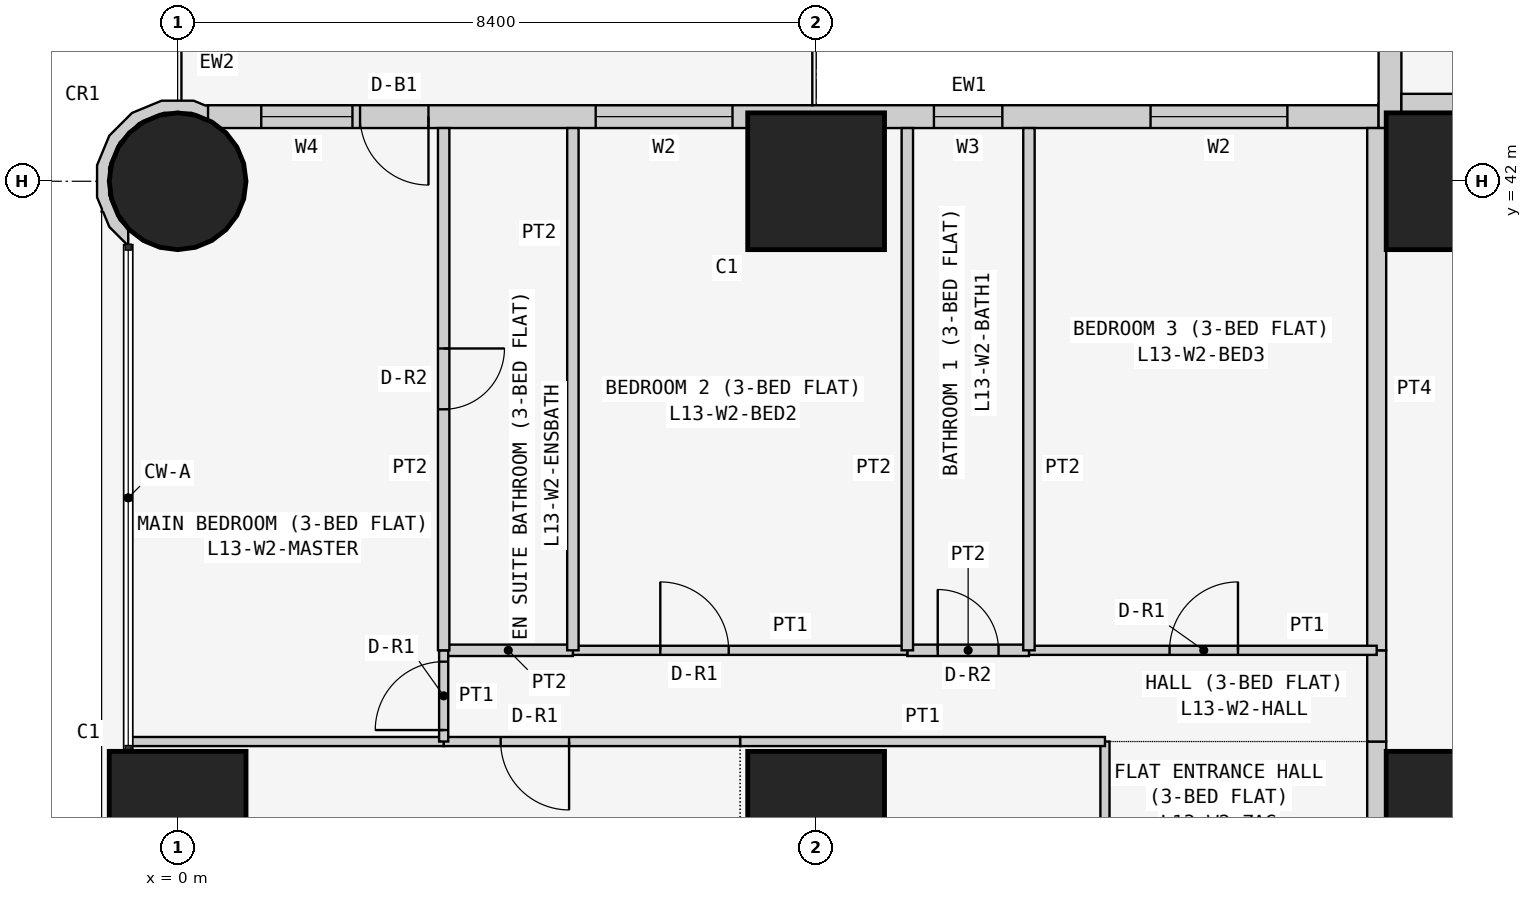
"""IFC4 building model, lengths in metres.
Left out: names, types, materials, properties, quantities, classifications, styles, units other than length and angle.
Written with IfcOpenShell. Run it as: python <this file> out.ifc"""

import sys

from ifc_helpers import new_model, si_unit, direction, frame, frame_2d, origin, origin_2d, place, context, subcontext, project, spatial, polyline, rectangle, circle, outline, extrude, element, fill, save


model = new_model("IFC4")
c1 = context("Model", 3, precision=1e-05, world=origin(), true_north=direction((0.0, 1.0)))
c2 = subcontext(c1, "Body", "Model", "MODEL_VIEW")
j1 = project(units=[si_unit("LENGTHUNIT", "METRE"), si_unit("PLANEANGLEUNIT", "RADIAN")], contexts=[c1])
p1 = place(None, origin())
s1 = spatial("IfcSite", under=j1, at=p1, CompositionType="ELEMENT")
p2 = place(p1, origin())
s2 = spatial("IfcBuilding", under=s1, at=p2, CompositionType="ELEMENT")
p3 = place(p2, frame((0.0, 0.0, 56.1)))
s3 = spatial("IfcBuildingStorey", under=s2, at=p3, CompositionType="ELEMENT", Elevation=56.1)
p4 = place(p3, frame((0.0, 33.6, 0.0), z_axis=(0.0, 0.0, 1.0), x_axis=(1.0, 0.0, 0.0)))
e1 = element("IfcColumn", 1, at=p4, inside=s3, PredefinedType="COLUMN", context=c2, shape_type="SweptSolid", body=[
    extrude(rectangle(XDim=1.8, YDim=1.8, at=origin_2d()), origin(), (0.0, 0.0, 1.0), 3.6),
])
p5 = place(p3, frame((0.0, 42.0, 0.0), z_axis=(0.0, 0.0, 1.0), x_axis=(1.0, 0.0, 0.0)))
e2 = element("IfcColumn", 2, at=p5, inside=s3, PredefinedType="COLUMN", context=c2, shape_type="SweptSolid", body=[
    extrude(circle(Radius=0.9, at=origin_2d()), origin(), (0.0, 0.0, 1.0), 3.6),
])
for number, where, z_axis, x_axis in (
    (3, (8.4, 33.6, 0.0), (0.0, 0.0, 1.0), (1.0, 0.0, 0.0)),
    (4, (8.4, 42.0, 0.0), (0.0, 0.0, 1.0), (1.0, 0.0, 0.0)),
    (5, (16.8, 33.6, 0.0), (0.0, 0.0, 1.0), (1.0, 0.0, 0.0)),
    (6, (16.8, 42.0, 0.0), (0.0, 0.0, 1.0), (1.0, 0.0, 0.0)),
):
    element("IfcColumn", number, at=place(p3, frame(where, z_axis=z_axis, x_axis=x_axis)), inside=s3, PredefinedType="COLUMN", context=c2, shape_type="SweptSolid", body=[
        extrude(rectangle(XDim=1.8, YDim=1.8, at=origin_2d()), origin(), (0.0, 0.0, 1.0), 3.6),
    ])
p6 = place(p3, frame((15.8, 42.85, 0.0), z_axis=(0.0, 0.0, 1.0), x_axis=(-1.0, 0.0, 0.0)))
e7 = element("IfcWall", 7, at=p6, inside=s3, PredefinedType="SOLIDWALL", context=c2, shape_type="SweptSolid", body=[
    extrude(rectangle(XDim=15.4, YDim=0.3, at=frame_2d((7.7, 0.0))), origin(), (0.0, 0.0, 1.0), 3.45),
])
p7 = place(p6, frame((1.2, 0.0, 0.9)))
e8 = element("IfcOpeningElement", 8, at=p7, cuts=e7, PredefinedType="OPENING", context=c2, shape_type="SweptSolid", body=[
    extrude(rectangle(XDim=1.8, YDim=1.5, at=frame_2d((0.9, 0.75))), frame((0.0, 0.16, 0.0), z_axis=(0.0, -1.0, 0.0), x_axis=(1.0, 0.0, 0.0)), (0.0, 0.0, 1.0), 0.32),
])
p8 = place(p6, frame((4.95, 0.0, 1.5)))
e9 = element("IfcOpeningElement", 9, at=p8, cuts=e7, PredefinedType="OPENING", context=c2, shape_type="SweptSolid", body=[
    extrude(rectangle(XDim=0.9, YDim=0.7, at=frame_2d((0.45, 0.35))), frame((0.0, 0.16, 0.0), z_axis=(0.0, -1.0, 0.0), x_axis=(1.0, 0.0, 0.0)), (0.0, 0.0, 1.0), 0.32),
])
p9 = place(p6, frame((8.5, 0.0, 0.9)))
e10 = element("IfcOpeningElement", 10, at=p9, cuts=e7, PredefinedType="OPENING", context=c2, shape_type="SweptSolid", body=[
    extrude(rectangle(XDim=1.8, YDim=1.5, at=frame_2d((0.9, 0.75))), frame((0.0, 0.16, 0.0), z_axis=(0.0, -1.0, 0.0), x_axis=(1.0, 0.0, 0.0)), (0.0, 0.0, 1.0), 0.32),
])
p10 = place(p6, frame((12.5, 0.0, 0.0)))
e11 = element("IfcOpeningElement", 11, at=p10, cuts=e7, PredefinedType="OPENING", context=c2, shape_type="SweptSolid", body=[
    extrude(rectangle(XDim=0.9, YDim=2.4, at=frame_2d((0.45, 1.2))), frame((0.0, 0.16, 0.0), z_axis=(0.0, -1.0, 0.0), x_axis=(1.0, 0.0, 0.0)), (0.0, 0.0, 1.0), 0.32),
])
p11 = place(p6, frame((13.5, 0.0, 0.9)))
e12 = element("IfcOpeningElement", 12, at=p11, cuts=e7, PredefinedType="OPENING", context=c2, shape_type="SweptSolid", body=[
    extrude(rectangle(XDim=1.2, YDim=1.5, at=frame_2d((0.6, 0.75))), frame((0.0, 0.16, 0.0), z_axis=(0.0, -1.0, 0.0), x_axis=(1.0, 0.0, 0.0)), (0.0, 0.0, 1.0), 0.32),
])
p12 = place(p3, frame((15.95, 58.4, 0.0), z_axis=(0.0, 0.0, 1.0), x_axis=(0.0, -1.0, 0.0)))
e13 = element("IfcWall", 13, at=p12, inside=s3, PredefinedType="SOLIDWALL", context=c2, shape_type="SweptSolid", body=[
    extrude(rectangle(XDim=15.7, YDim=0.3, at=frame_2d((7.85, 0.0))), origin(), (0.0, 0.0, 1.0), 3.45),
])
p13 = place(p12, frame((12.4, 0.0, 0.9)))
e14 = element("IfcOpeningElement", 14, at=p13, cuts=e13, PredefinedType="OPENING", context=c2, shape_type="SweptSolid", body=[
    extrude(rectangle(XDim=1.8, YDim=1.5, at=frame_2d((0.9, 0.75))), frame((0.0, 0.16, 0.0), z_axis=(0.0, -1.0, 0.0), x_axis=(1.0, 0.0, 0.0)), (0.0, 0.0, 1.0), 0.32),
])
p14 = place(p12, frame((9.55, 0.0, 1.5)))
e15 = element("IfcOpeningElement", 15, at=p14, cuts=e13, PredefinedType="OPENING", context=c2, shape_type="SweptSolid", body=[
    extrude(rectangle(XDim=0.9, YDim=0.7, at=frame_2d((0.45, 0.35))), frame((0.0, 0.16, 0.0), z_axis=(0.0, -1.0, 0.0), x_axis=(1.0, 0.0, 0.0)), (0.0, 0.0, 1.0), 0.32),
])
p15 = place(p12, frame((5.1, 0.0, 0.9)))
e16 = element("IfcOpeningElement", 16, at=p15, cuts=e13, PredefinedType="OPENING", context=c2, shape_type="SweptSolid", body=[
    extrude(rectangle(XDim=1.8, YDim=1.5, at=frame_2d((0.9, 0.75))), frame((0.0, 0.16, 0.0), z_axis=(0.0, -1.0, 0.0), x_axis=(1.0, 0.0, 0.0)), (0.0, 0.0, 1.0), 0.32),
])
p16 = place(p12, frame((2.0, 0.0, 0.0)))
e17 = element("IfcOpeningElement", 17, at=p16, cuts=e13, PredefinedType="OPENING", context=c2, shape_type="SweptSolid", body=[
    extrude(rectangle(XDim=0.9, YDim=2.4, at=frame_2d((0.45, 1.2))), frame((0.0, 0.16, 0.0), z_axis=(0.0, -1.0, 0.0), x_axis=(1.0, 0.0, 0.0)), (0.0, 0.0, 1.0), 0.32),
])
p17 = place(p12, frame((0.7, 0.0, 0.9)))
e18 = element("IfcOpeningElement", 18, at=p17, cuts=e13, PredefinedType="OPENING", context=c2, shape_type="SweptSolid", body=[
    extrude(rectangle(XDim=1.2, YDim=1.5, at=frame_2d((0.6, 0.75))), frame((0.0, 0.16, 0.0), z_axis=(0.0, -1.0, 0.0), x_axis=(1.0, 0.0, 0.0)), (0.0, 0.0, 1.0), 0.32),
])
p18 = place(p3, frame((0.364, 42.91, 0.0), z_axis=(0.0, 0.0, 1.0), x_axis=(-0.926129809145, 0.377204953059, 0.0)))
e19 = element("IfcWall", 19, at=p18, inside=s3, PredefinedType="SOLIDWALL", context=c2, shape_type="SweptSolid", body=[
    extrude(outline(polyline([(0.36, 1.803), (0.509, 1.741), (0.761, 1.486), (0.896, 1.154), (0.894, 0.795), (0.755, 0.465), (0.5, 0.213), (0.168, 0.078), (-0.1, 0.08), (0.001, -0.097), (0.03, -0.08), (0.199, -0.081), (0.589, 0.078), (0.889, 0.374), (1.053, 0.763), (1.055, 1.185), (0.896, 1.575), (0.778, 1.695), (0.769, 1.728), (0.75, 1.723), (0.6, 1.875), (0.295, 2.003), (0.281, 1.998), (0.36, 1.803)])), origin(), (0.0, 0.0, 1.0), 3.45),
])
p19 = place(p3, frame((16.1, 43.025, 0.0), z_axis=(0.0, 0.0, 1.0), x_axis=(1.0, 0.0, 0.0)))
e20 = element("IfcWall", 20, at=p19, inside=s3, PredefinedType="PARTITIONING", context=c2, shape_type="SweptSolid", body=[
    extrude(rectangle(XDim=6.871, YDim=0.25, at=frame_2d((3.436, 0.0))), origin(), (0.0, 0.0, 1.0), 3.45),
])
p20 = place(p3, frame((15.775, 29.4, 0.0), z_axis=(0.0, 0.0, 1.0), x_axis=(0.0, 1.0, 0.0)))
e21 = element("IfcWall", 21, at=p20, inside=s3, PredefinedType="PARTITIONING", context=c2, shape_type="SweptSolid", body=[
    extrude(rectangle(XDim=5.229, YDim=0.25, at=frame_2d((2.615, 0.0))), origin(), (0.0, 0.0, 1.0), 3.45),
])
p21 = place(p20, frame((2.1, 0.0, 0.0)))
e22 = element("IfcOpeningElement", 22, at=p21, cuts=e21, PredefinedType="OPENING", context=c2, shape_type="SweptSolid", body=[
    extrude(rectangle(XDim=1.0, YDim=2.1, at=frame_2d((0.5, 1.05))), frame((0.0, 0.135, 0.0), z_axis=(0.0, -1.0, 0.0), x_axis=(1.0, 0.0, 0.0)), (0.0, 0.0, 1.0), 0.27),
])
p22 = place(p3, frame((15.775, 34.629, 0.0), z_axis=(0.0, 0.0, 1.0), x_axis=(0.0, 1.0, 0.0)))
e23 = element("IfcWall", 23, at=p22, inside=s3, PredefinedType="PARTITIONING", context=c2, shape_type="SweptSolid", body=[
    extrude(rectangle(XDim=1.2, YDim=0.25, at=frame_2d((0.6, 0.0))), origin(), (0.0, 0.0, 1.0), 3.45),
])
p23 = place(p3, frame((15.775, 35.829, 0.0), z_axis=(0.0, 0.0, 1.0), x_axis=(0.0, 1.0, 0.0)))
e24 = element("IfcWall", 24, at=p23, inside=s3, PredefinedType="PARTITIONING", context=c2, shape_type="SweptSolid", body=[
    extrude(rectangle(XDim=6.871, YDim=0.25, at=frame_2d((3.436, 0.0))), origin(), (0.0, 0.0, 1.0), 3.45),
])
p24 = place(p3, frame((12.2, 29.4, 0.0), z_axis=(0.0, 0.0, 1.0), x_axis=(0.0, 1.0, 0.0)))
e25 = element("IfcWall", 25, at=p24, inside=s3, PredefinedType="PARTITIONING", context=c2, shape_type="SweptSolid", body=[
    extrude(rectangle(XDim=5.229, YDim=0.12, at=frame_2d((2.615, 0.0))), origin(), (0.0, 0.0, 1.0), 3.45),
])
p25 = place(p24, frame((1.05, 0.0, 0.0)))
e26 = element("IfcOpeningElement", 26, at=p25, cuts=e25, PredefinedType="OPENING", context=c2, shape_type="SweptSolid", body=[
    extrude(rectangle(XDim=0.9, YDim=2.1, at=frame_2d((0.45, 1.05))), frame((0.0, 0.07, 0.0), z_axis=(0.0, -1.0, 0.0), x_axis=(1.0, 0.0, 0.0)), (0.0, 0.0, 1.0), 0.14),
])
p26 = place(p3, frame((7.4, 34.629, 0.0), z_axis=(0.0, 0.0, 1.0), x_axis=(1.0, 0.0, 0.0)))
e27 = element("IfcWall", 27, at=p26, inside=s3, PredefinedType="PARTITIONING", context=c2, shape_type="SweptSolid", body=[
    extrude(rectangle(XDim=4.8, YDim=0.12, at=frame_2d((2.4, 0.0))), origin(), (0.0, 0.0, 1.0), 3.45),
])
p27 = place(p3, frame((3.5, 34.629, 0.0), z_axis=(0.0, 0.0, 1.0), x_axis=(1.0, 0.0, 0.0)))
e28 = element("IfcWall", 28, at=p27, inside=s3, PredefinedType="PARTITIONING", context=c2, shape_type="SweptSolid", body=[
    extrude(rectangle(XDim=3.9, YDim=0.12, at=frame_2d((1.95, 0.0))), origin(), (0.0, 0.0, 1.0), 3.45),
])
p28 = place(p27, frame((0.75, 0.0, 0.0)))
e29 = element("IfcOpeningElement", 29, at=p28, cuts=e28, PredefinedType="OPENING", context=c2, shape_type="SweptSolid", body=[
    extrude(rectangle(XDim=0.9, YDim=2.1, at=frame_2d((0.45, 1.05))), frame((0.0, 0.07, 0.0), z_axis=(0.0, -1.0, 0.0), x_axis=(1.0, 0.0, 0.0)), (0.0, 0.0, 1.0), 0.14),
])
p29 = place(p3, frame((-0.65, 34.629, 0.0), z_axis=(0.0, 0.0, 1.0), x_axis=(1.0, 0.0, 0.0)))
e30 = element("IfcWall", 30, at=p29, inside=s3, PredefinedType="PARTITIONING", context=c2, shape_type="SweptSolid", body=[
    extrude(rectangle(XDim=4.15, YDim=0.12, at=frame_2d((2.075, 0.0))), origin(), (0.0, 0.0, 1.0), 3.45),
])
p30 = place(p3, frame((11.2, 35.829, 0.0), z_axis=(0.0, 0.0, 1.0), x_axis=(1.0, 0.0, 0.0)))
e31 = element("IfcWall", 31, at=p30, inside=s3, PredefinedType="PARTITIONING", context=c2, shape_type="SweptSolid", body=[
    extrude(rectangle(XDim=4.575, YDim=0.12, at=frame_2d((2.288, 0.0))), origin(), (0.0, 0.0, 1.0), 3.45),
])
p31 = place(p30, frame((1.85, 0.0, 0.0)))
e32 = element("IfcOpeningElement", 32, at=p31, cuts=e31, PredefinedType="OPENING", context=c2, shape_type="SweptSolid", body=[
    extrude(rectangle(XDim=0.9, YDim=2.1, at=frame_2d((0.45, 1.05))), frame((0.0, 0.07, 0.0), z_axis=(0.0, -1.0, 0.0), x_axis=(1.0, 0.0, 0.0)), (0.0, 0.0, 1.0), 0.14),
])
p32 = place(p3, frame((9.6, 35.829, 0.0), z_axis=(0.0, 0.0, 1.0), x_axis=(1.0, 0.0, 0.0)))
e33 = element("IfcWall", 33, at=p32, inside=s3, PredefinedType="PARTITIONING", context=c2, shape_type="SweptSolid", body=[
    extrude(rectangle(XDim=1.6, YDim=0.15, at=frame_2d((0.8, 0.0))), origin(), (0.0, 0.0, 1.0), 3.45),
])
p33 = place(p32, frame((0.4, 0.0, 0.0)))
e34 = element("IfcOpeningElement", 34, at=p33, cuts=e33, PredefinedType="OPENING", context=c2, shape_type="SweptSolid", body=[
    extrude(rectangle(XDim=0.8, YDim=2.1, at=frame_2d((0.4, 1.05))), frame((0.0, 0.085, 0.0), z_axis=(0.0, -1.0, 0.0), x_axis=(1.0, 0.0, 0.0)), (0.0, 0.0, 1.0), 0.17),
])
p34 = place(p3, frame((5.2, 35.829, 0.0), z_axis=(0.0, 0.0, 1.0), x_axis=(1.0, 0.0, 0.0)))
e35 = element("IfcWall", 35, at=p34, inside=s3, PredefinedType="PARTITIONING", context=c2, shape_type="SweptSolid", body=[
    extrude(rectangle(XDim=4.4, YDim=0.12, at=frame_2d((2.2, 0.0))), origin(), (0.0, 0.0, 1.0), 3.45),
])
p35 = place(p34, frame((1.15, 0.0, 0.0)))
e36 = element("IfcOpeningElement", 36, at=p35, cuts=e35, PredefinedType="OPENING", context=c2, shape_type="SweptSolid", body=[
    extrude(rectangle(XDim=0.9, YDim=2.1, at=frame_2d((0.45, 1.05))), frame((0.0, 0.07, 0.0), z_axis=(0.0, -1.0, 0.0), x_axis=(1.0, 0.0, 0.0)), (0.0, 0.0, 1.0), 0.14),
])
p36 = place(p3, frame((3.5, 35.829, 0.0), z_axis=(0.0, 0.0, 1.0), x_axis=(1.0, 0.0, 0.0)))
e37 = element("IfcWall", 37, at=p36, inside=s3, PredefinedType="PARTITIONING", context=c2, shape_type="SweptSolid", body=[
    extrude(rectangle(XDim=1.7, YDim=0.15, at=frame_2d((0.85, 0.0))), origin(), (0.0, 0.0, 1.0), 3.45),
])
p37 = place(p3, frame((3.5, 34.629, 0.0), z_axis=(0.0, 0.0, 1.0), x_axis=(0.0, 1.0, 0.0)))
e38 = element("IfcWall", 38, at=p37, inside=s3, PredefinedType="PARTITIONING", context=c2, shape_type="SweptSolid", body=[
    extrude(rectangle(XDim=1.2, YDim=0.12, at=frame_2d((0.6, 0.0))), origin(), (0.0, 0.0, 1.0), 3.45),
])
p38 = place(p37, frame((0.151, 0.0, 0.0)))
e39 = element("IfcOpeningElement", 39, at=p38, cuts=e38, PredefinedType="OPENING", context=c2, shape_type="SweptSolid", body=[
    extrude(rectangle(XDim=0.9, YDim=2.1, at=frame_2d((0.45, 1.05))), frame((0.0, 0.07, 0.0), z_axis=(0.0, -1.0, 0.0), x_axis=(1.0, 0.0, 0.0)), (0.0, 0.0, 1.0), 0.14),
])
for number, where, z_axis, x_axis in (
    (40, (11.2, 35.829, 0.0), (0.0, 0.0, 1.0), (0.0, 1.0, 0.0)),
    (41, (9.6, 35.829, 0.0), (0.0, 0.0, 1.0), (0.0, 1.0, 0.0)),
    (42, (5.2, 35.829, 0.0), (0.0, 0.0, 1.0), (0.0, 1.0, 0.0)),
):
    element("IfcWall", number, at=place(p3, frame(where, z_axis=z_axis, x_axis=x_axis)), inside=s3, PredefinedType="PARTITIONING", context=c2, shape_type="SweptSolid", body=[
        extrude(rectangle(XDim=6.871, YDim=0.15, at=frame_2d((3.436, 0.0))), origin(), (0.0, 0.0, 1.0), 3.45),
    ])
p39 = place(p3, frame((3.5, 35.829, 0.0), z_axis=(0.0, 0.0, 1.0), x_axis=(0.0, 1.0, 0.0)))
e43 = element("IfcWall", 43, at=p39, inside=s3, PredefinedType="PARTITIONING", context=c2, shape_type="SweptSolid", body=[
    extrude(rectangle(XDim=6.871, YDim=0.15, at=frame_2d((3.436, 0.0))), origin(), (0.0, 0.0, 1.0), 3.45),
])
p40 = place(p39, frame((3.171, 0.0, 0.0)))
e44 = element("IfcOpeningElement", 44, at=p40, cuts=e43, PredefinedType="OPENING", context=c2, shape_type="SweptSolid", body=[
    extrude(rectangle(XDim=0.8, YDim=2.1, at=frame_2d((0.4, 1.05))), frame((0.0, 0.085, 0.0), z_axis=(0.0, -1.0, 0.0), x_axis=(1.0, 0.0, 0.0)), (0.0, 0.0, 1.0), 0.17),
])
p41 = place(p7, origin())
e45 = element("IfcWindow", 45, at=p41, inside=s3, PartitioningType="SINGLE_PANEL", PredefinedType="WINDOW", context=c2, shape_type="SweptSolid", body=[
    extrude(rectangle(XDim=1.8, YDim=1.5, at=frame_2d((0.9, 0.75))), frame((0.0, 0.03, 0.0), z_axis=(0.0, -1.0, 0.0), x_axis=(1.0, 0.0, 0.0)), (0.0, 0.0, 1.0), 0.06),
])
fill(e8, e45)
p42 = place(p8, origin())
e46 = element("IfcWindow", 46, at=p42, inside=s3, PartitioningType="SINGLE_PANEL", PredefinedType="WINDOW", context=c2, shape_type="SweptSolid", body=[
    extrude(rectangle(XDim=0.9, YDim=0.7, at=frame_2d((0.45, 0.35))), frame((0.0, 0.03, 0.0), z_axis=(0.0, -1.0, 0.0), x_axis=(1.0, 0.0, 0.0)), (0.0, 0.0, 1.0), 0.06),
])
fill(e9, e46)
p43 = place(p9, origin())
e47 = element("IfcWindow", 47, at=p43, inside=s3, PartitioningType="SINGLE_PANEL", PredefinedType="WINDOW", context=c2, shape_type="SweptSolid", body=[
    extrude(rectangle(XDim=1.8, YDim=1.5, at=frame_2d((0.9, 0.75))), frame((0.0, 0.03, 0.0), z_axis=(0.0, -1.0, 0.0), x_axis=(1.0, 0.0, 0.0)), (0.0, 0.0, 1.0), 0.06),
])
fill(e10, e47)
p44 = place(p10, origin())
e48 = element("IfcDoor", 48, at=p44, inside=s3, OperationType="SINGLE_SWING_LEFT", PredefinedType="DOOR", context=c2, shape_type="SweptSolid", body=[
    extrude(rectangle(XDim=0.9, YDim=2.4, at=frame_2d((0.45, 1.2))), frame((0.0, 0.025, 0.0), z_axis=(0.0, -1.0, 0.0), x_axis=(1.0, 0.0, 0.0)), (0.0, 0.0, 1.0), 0.05),
])
fill(e11, e48)
p45 = place(p11, origin())
e49 = element("IfcWindow", 49, at=p45, inside=s3, PartitioningType="SINGLE_PANEL", PredefinedType="WINDOW", context=c2, shape_type="SweptSolid", body=[
    extrude(rectangle(XDim=1.2, YDim=1.5, at=frame_2d((0.6, 0.75))), frame((0.0, 0.03, 0.0), z_axis=(0.0, -1.0, 0.0), x_axis=(1.0, 0.0, 0.0)), (0.0, 0.0, 1.0), 0.06),
])
fill(e12, e49)
p46 = place(p28, frame((0.9, 0.0, 0.0), z_axis=(0.0, 0.0, 1.0), x_axis=(-1.0, 0.0, 0.0)))
e50 = element("IfcDoor", 50, at=p46, inside=s3, OperationType="SINGLE_SWING_LEFT", PredefinedType="DOOR", context=c2, shape_type="SweptSolid", body=[
    extrude(rectangle(XDim=0.9, YDim=2.1, at=frame_2d((0.45, 1.05))), frame((0.0, 0.025, 0.0), z_axis=(0.0, -1.0, 0.0), x_axis=(1.0, 0.0, 0.0)), (0.0, 0.0, 1.0), 0.05),
])
fill(e29, e50)
p47 = place(p31, origin())
e51 = element("IfcDoor", 51, at=p47, inside=s3, OperationType="SINGLE_SWING_RIGHT", PredefinedType="DOOR", context=c2, shape_type="SweptSolid", body=[
    extrude(rectangle(XDim=0.9, YDim=2.1, at=frame_2d((0.45, 1.05))), frame((0.0, 0.025, 0.0), z_axis=(0.0, -1.0, 0.0), x_axis=(1.0, 0.0, 0.0)), (0.0, 0.0, 1.0), 0.05),
])
fill(e32, e51)
p48 = place(p33, origin())
e52 = element("IfcDoor", 52, at=p48, inside=s3, OperationType="SINGLE_SWING_LEFT", PredefinedType="DOOR", context=c2, shape_type="SweptSolid", body=[
    extrude(rectangle(XDim=0.8, YDim=2.1, at=frame_2d((0.4, 1.05))), frame((0.0, 0.025, 0.0), z_axis=(0.0, -1.0, 0.0), x_axis=(1.0, 0.0, 0.0)), (0.0, 0.0, 1.0), 0.05),
])
fill(e34, e52)
p49 = place(p35, origin())
e53 = element("IfcDoor", 53, at=p49, inside=s3, OperationType="SINGLE_SWING_LEFT", PredefinedType="DOOR", context=c2, shape_type="SweptSolid", body=[
    extrude(rectangle(XDim=0.9, YDim=2.1, at=frame_2d((0.45, 1.05))), frame((0.0, 0.025, 0.0), z_axis=(0.0, -1.0, 0.0), x_axis=(1.0, 0.0, 0.0)), (0.0, 0.0, 1.0), 0.05),
])
fill(e36, e53)
p50 = place(p38, origin())
e54 = element("IfcDoor", 54, at=p50, inside=s3, OperationType="SINGLE_SWING_LEFT", PredefinedType="DOOR", context=c2, shape_type="SweptSolid", body=[
    extrude(rectangle(XDim=0.9, YDim=2.1, at=frame_2d((0.45, 1.05))), frame((0.0, 0.025, 0.0), z_axis=(0.0, -1.0, 0.0), x_axis=(1.0, 0.0, 0.0)), (0.0, 0.0, 1.0), 0.05),
])
fill(e39, e54)
p51 = place(p40, frame((0.8, 0.0, 0.0), z_axis=(0.0, 0.0, 1.0), x_axis=(-1.0, 0.0, 0.0)))
e55 = element("IfcDoor", 55, at=p51, inside=s3, OperationType="SINGLE_SWING_LEFT", PredefinedType="DOOR", context=c2, shape_type="SweptSolid", body=[
    extrude(rectangle(XDim=0.8, YDim=2.1, at=frame_2d((0.4, 1.05))), frame((0.0, 0.025, 0.0), z_axis=(0.0, -1.0, 0.0), x_axis=(1.0, 0.0, 0.0)), (0.0, 0.0, 1.0), 0.05),
])
fill(e44, e55)
save(model, sys.argv[1])
